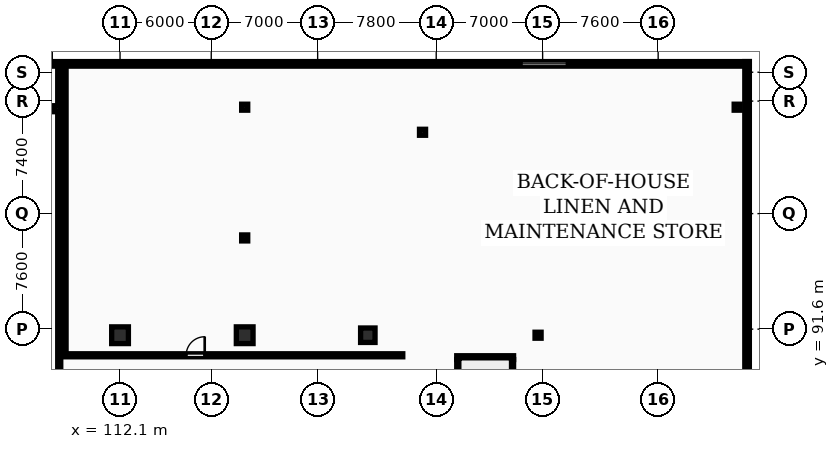
"""IFC4 building model, lengths in metres.
Left out: names, types, materials, properties, quantities, classifications, styles, units other than length and angle.
Written with IfcOpenShell. Run it as: python <this file> out.ifc"""

import sys

from ifc_helpers import new_model, si_unit, direction, frame, frame_2d, origin, origin_2d, place, context, subcontext, project, spatial, rectangle, circle, i_section, extrude, element, fill, save


model = new_model("IFC4")
c1 = context("Model", 3, precision=1e-05, world=origin(), true_north=direction((0.0, 1.0)))
c2 = subcontext(c1, "Body", "Model", "MODEL_VIEW")
j1 = project(units=[si_unit("LENGTHUNIT", "METRE"), si_unit("PLANEANGLEUNIT", "RADIAN")], contexts=[c1])
p1 = place(None, origin())
s1 = spatial("IfcSite", under=j1, at=p1, CompositionType="ELEMENT")
p2 = place(p1, origin())
s2 = spatial("IfcBuilding", under=s1, at=p2, CompositionType="ELEMENT")
p3 = place(p2, origin())
s3 = spatial("IfcBuildingStorey", under=s2, at=p3, CompositionType="ELEMENT", Elevation=0.0)
for number, where, z_axis, x_axis in (
    (1, (112.1, 91.2, 0.0), (0.0, 0.0, 1.0), (1.0, 0.0, 0.0)),
    (2, (120.3, 91.2, 0.0), (0.0, 0.0, 1.0), (1.0, 0.0, 0.0)),
):
    element("IfcColumn", number, at=place(p3, frame(where, z_axis=z_axis, x_axis=x_axis)), inside=s3, PredefinedType="COLUMN", context=c2, shape_type="SweptSolid", body=[
        extrude(rectangle(XDim=1.1, YDim=1.1, at=origin_2d()), origin(), (0.0, 0.0, 1.0), 5.4),
    ])
p4 = place(p3, frame((128.4, 91.2, 0.0), z_axis=(0.0, 0.0, 1.0), x_axis=(1.0, 0.0, 0.0)))
e3 = element("IfcColumn", 3, at=p4, inside=s3, PredefinedType="COLUMN", context=c2, shape_type="SweptSolid", body=[
    extrude(circle(Radius=0.475, at=origin_2d()), origin(), (0.0, 0.0, 1.0), 5.4),
])
for number, where, z_axis, x_axis in (
    (4, (139.6, 91.2, 0.0), (0.0, 0.0, 1.0), (1.0, 0.0, 0.0)),
    (5, (120.3, 97.6, 0.0), (0.0, 0.0, 1.0), (1.0, 0.0, 0.0)),
    (6, (108.0, 106.1, 0.0), (0.0, 0.0, 1.0), (1.0, 0.0, 0.0)),
    (7, (132.0, 104.55, 0.0), (0.0, 0.0, 1.0), (1.0, 0.0, 0.0)),
    (8, (152.7, 106.2, 0.0), (0.0, 0.0, 1.0), (1.0, 0.0, 0.0)),
    (9, (120.3, 106.2, 0.0), (0.0, 0.0, 1.0), (1.0, 0.0, 0.0)),
):
    element("IfcColumn", number, at=place(p3, frame(where, z_axis=z_axis, x_axis=x_axis)), inside=s3, PredefinedType="COLUMN", context=c2, shape_type="SweptSolid", body=[
        extrude(i_section(OverallWidth=0.399, OverallDepth=0.394, WebThickness=0.023, FlangeThickness=0.037, FilletRadius=0.015, at=origin_2d()), origin(), (0.0, 0.0, 1.0), 5.4),
    ])
p5 = place(p3, frame((153.5, 109.05, 0.0), z_axis=(0.0, 0.0, 1.0), x_axis=(-1.0, 0.0, 0.0)))
e10 = element("IfcWall", 10, at=p5, inside=s3, PredefinedType="STANDARD", context=c2, shape_type="SweptSolid", body=[
    extrude(rectangle(XDim=48.6, YDim=0.3, at=frame_2d((24.3, 0.0))), origin(), (0.0, 0.0, 1.0), 5.1),
])
p6 = place(p5, frame((45.9, 0.0, 0.0)))
e11 = element("IfcOpeningElement", 11, at=p6, cuts=e10, PredefinedType="OPENING", context=c2, shape_type="SweptSolid", body=[
    extrude(rectangle(XDim=1.8, YDim=2.2, at=frame_2d((0.9, 1.1))), frame((0.0, 0.16, 0.0), z_axis=(0.0, -1.0, 0.0), x_axis=(1.0, 0.0, 0.0)), (0.0, 0.0, 1.0), 0.32),
])
p7 = place(p5, frame((12.0, 0.0, 0.9)))
e12 = element("IfcOpeningElement", 12, at=p7, cuts=e10, PredefinedType="OPENING", context=c2, shape_type="SweptSolid", body=[
    extrude(rectangle(XDim=3.0, YDim=2.6, at=frame_2d((1.5, 1.3))), frame((0.0, 0.16, 0.0), z_axis=(0.0, -1.0, 0.0), x_axis=(1.0, 0.0, 0.0)), (0.0, 0.0, 1.0), 0.32),
])
p8 = place(p3, frame((153.35, -26.5, 0.0), z_axis=(0.0, 0.0, 1.0), x_axis=(0.0, 1.0, 0.0)))
e13 = element("IfcWall", 13, at=p8, inside=s3, PredefinedType="STANDARD", context=c2, shape_type="SweptSolid", body=[
    extrude(rectangle(XDim=135.7, YDim=0.3, at=frame_2d((67.85, 0.0))), origin(), (0.0, 0.0, 1.0), 5.1),
])
p9 = place(p8, frame((60.8, 0.0, 0.0)))
e14 = element("IfcOpeningElement", 14, at=p9, cuts=e13, PredefinedType="OPENING", context=c2, shape_type="SweptSolid", body=[
    extrude(rectangle(XDim=7.2, YDim=3.2, at=frame_2d((3.6, 1.6))), frame((0.0, 0.16, 0.0), z_axis=(0.0, -1.0, 0.0), x_axis=(1.0, 0.0, 0.0)), (0.0, 0.0, 1.0), 0.32),
])
p10 = place(p8, frame((70.1, 0.0, 0.0)))
e15 = element("IfcOpeningElement", 15, at=p10, cuts=e13, PredefinedType="OPENING", context=c2, shape_type="SweptSolid", body=[
    extrude(rectangle(XDim=1.8, YDim=2.2, at=frame_2d((0.9, 1.1))), frame((0.0, 0.16, 0.0), z_axis=(0.0, -1.0, 0.0), x_axis=(1.0, 0.0, 0.0)), (0.0, 0.0, 1.0), 0.32),
])
p11 = place(p8, frame((77.5, 0.0, 0.0)))
e16 = element("IfcOpeningElement", 16, at=p11, cuts=e13, PredefinedType="OPENING", context=c2, shape_type="SweptSolid", body=[
    extrude(rectangle(XDim=4.2, YDim=3.6, at=frame_2d((2.1, 1.8))), frame((0.0, 0.16, 0.0), z_axis=(0.0, -1.0, 0.0), x_axis=(1.0, 0.0, 0.0)), (0.0, 0.0, 1.0), 0.32),
])
p12 = place(p8, frame((11.0, 0.0, 0.0)))
e17 = element("IfcOpeningElement", 17, at=p12, cuts=e13, PredefinedType="OPENING", context=c2, shape_type="SweptSolid", body=[
    extrude(rectangle(XDim=1.8, YDim=2.2, at=frame_2d((0.9, 1.1))), frame((0.0, 0.16, 0.0), z_axis=(0.0, -1.0, 0.0), x_axis=(1.0, 0.0, 0.0)), (0.0, 0.0, 1.0), 0.32),
])
p13 = place(p8, frame((105.8, 0.0, 0.0)))
e18 = element("IfcOpeningElement", 18, at=p13, cuts=e13, PredefinedType="OPENING", context=c2, shape_type="SweptSolid", body=[
    extrude(rectangle(XDim=1.8, YDim=2.2, at=frame_2d((0.9, 1.1))), frame((0.0, 0.16, 0.0), z_axis=(0.0, -1.0, 0.0), x_axis=(1.0, 0.0, 0.0)), (0.0, 0.0, 1.0), 0.32),
])
p14 = place(p3, frame((134.375, 82.0, 0.0), z_axis=(0.0, 0.0, 1.0), x_axis=(0.0, 1.0, 0.0)))
e19 = element("IfcWall", 19, at=p14, inside=s3, PredefinedType="SHEAR", context=c2, shape_type="SweptSolid", body=[
    extrude(rectangle(XDim=7.6, YDim=0.25, at=frame_2d((3.8, 0.0))), origin(), (0.0, 0.0, 1.0), 5.4),
])
p15 = place(p14, frame((0.4, 0.0, 0.0)))
e20 = element("IfcOpeningElement", 20, at=p15, cuts=e19, PredefinedType="OPENING", context=c2, shape_type="SweptSolid", body=[
    extrude(rectangle(XDim=1.1, YDim=2.1, at=frame_2d((0.55, 1.05))), frame((0.0, 0.135, 0.0), z_axis=(0.0, -1.0, 0.0), x_axis=(1.0, 0.0, 0.0)), (0.0, 0.0, 1.0), 0.27),
])
p16 = place(p3, frame((137.865, 82.0, 0.0), z_axis=(0.0, 0.0, 1.0), x_axis=(0.0, 1.0, 0.0)))
e21 = element("IfcWall", 21, at=p16, inside=s3, PredefinedType="SHEAR", context=c2, shape_type="SweptSolid", body=[
    extrude(rectangle(XDim=7.6, YDim=0.25, at=frame_2d((3.8, 0.0))), origin(), (0.0, 0.0, 1.0), 5.4),
])
p17 = place(p3, frame((134.25, 89.725, 0.0), z_axis=(0.0, 0.0, 1.0), x_axis=(1.0, 0.0, 0.0)))
e22 = element("IfcWall", 22, at=p17, inside=s3, PredefinedType="SHEAR", context=c2, shape_type="SweptSolid", body=[
    extrude(rectangle(XDim=3.74, YDim=0.25, at=frame_2d((1.87, 0.0))), origin(), (0.0, 0.0, 1.0), 5.4),
])
p18 = place(p3, frame((108.1, 67.45, 0.0), z_axis=(0.0, 0.0, 1.0), x_axis=(0.0, 1.0, 0.0)))
e23 = element("IfcWall", 23, at=p18, inside=s3, PredefinedType="PARTITIONING", context=c2, shape_type="SweptSolid", body=[
    extrude(rectangle(XDim=41.45, YDim=0.2, at=frame_2d((20.725, 0.0))), origin(), (0.0, 0.0, 1.0), 5.1),
])
p19 = place(p3, frame((108.45, 89.88, 0.0), z_axis=(0.0, 0.0, 1.0), x_axis=(1.0, 0.0, 0.0)))
e24 = element("IfcWall", 24, at=p19, inside=s3, PredefinedType="PARTITIONING", context=c2, shape_type="SweptSolid", body=[
    extrude(rectangle(XDim=22.25, YDim=0.2, at=frame_2d((11.125, 0.0))), origin(), (0.0, 0.0, 1.0), 5.1),
])
p20 = place(p19, frame((8.0, 0.0, 0.0)))
e25 = element("IfcOpeningElement", 25, at=p20, cuts=e24, PredefinedType="OPENING", context=c2, shape_type="SweptSolid", body=[
    extrude(rectangle(XDim=1.22, YDim=2.18, at=frame_2d((0.61, 1.09))), frame((0.0, 0.11, 0.0), z_axis=(0.0, -1.0, 0.0), x_axis=(1.0, 0.0, 0.0)), (0.0, 0.0, 1.0), 0.22),
])
p21 = place(p3, frame((108.45, 89.88, 0.0), z_axis=(0.0, 0.0, 1.0), x_axis=(0.0, 1.0, 0.0)))
e26 = element("IfcWall", 26, at=p21, inside=s3, PredefinedType="PARTITIONING", context=c2, shape_type="SweptSolid", body=[
    extrude(rectangle(XDim=19.07, YDim=0.2, at=frame_2d((9.535, 0.0))), origin(), (0.0, 0.0, 1.0), 5.1),
])
p22 = place(p7, origin())
e27 = element("IfcWindow", 27, at=p22, inside=s3, PartitioningType="TRIPLE_PANEL_VERTICAL", PredefinedType="WINDOW", context=c2, shape_type="SweptSolid", body=[
    extrude(rectangle(XDim=3.0, YDim=2.6, at=frame_2d((1.5, 1.3))), frame((0.0, 0.03, 0.0), z_axis=(0.0, -1.0, 0.0), x_axis=(1.0, 0.0, 0.0)), (0.0, 0.0, 1.0), 0.06),
])
fill(e12, e27)
p23 = place(p20, origin())
e28 = element("IfcDoor", 28, at=p23, inside=s3, OperationType="SINGLE_SWING_RIGHT", PredefinedType="DOOR", context=c2, shape_type="SweptSolid", body=[
    extrude(rectangle(XDim=1.22, YDim=2.18, at=frame_2d((0.61, 1.09))), frame((0.0, 0.025, 0.0), z_axis=(0.0, -1.0, 0.0), x_axis=(1.0, 0.0, 0.0)), (0.0, 0.0, 1.0), 0.05),
])
fill(e25, e28)
save(model, sys.argv[1])
